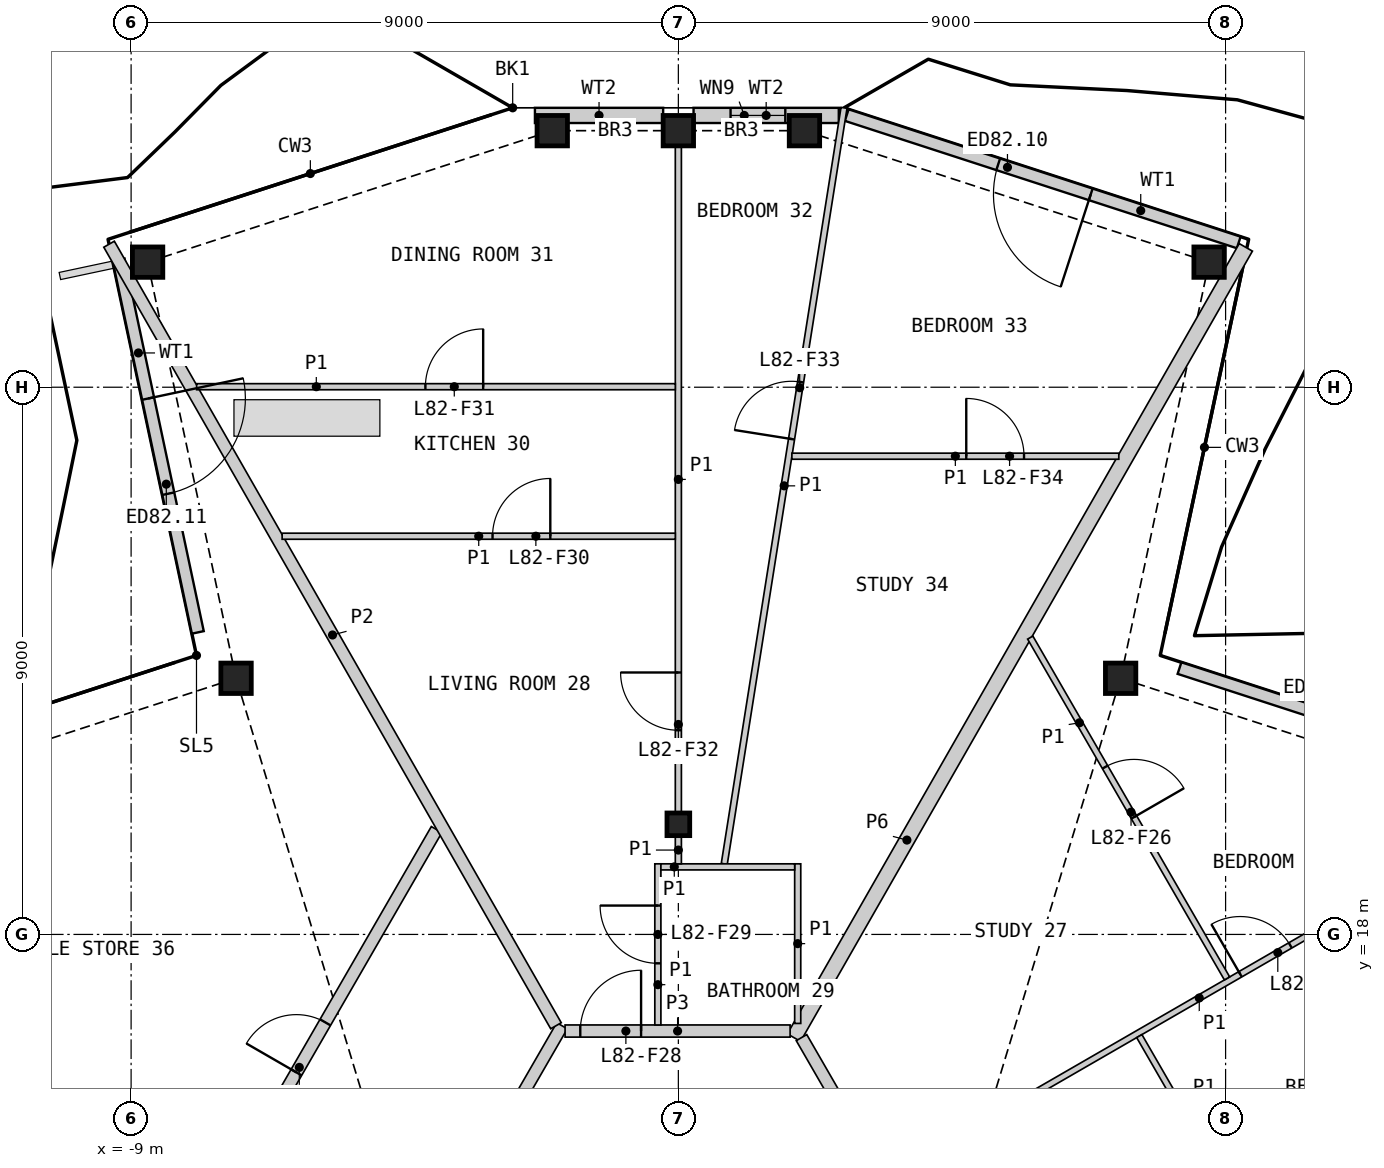
"""IFC4 building model, lengths in metres.
Left out: names, types, materials, properties, quantities, classifications, styles, units other than length and angle.
Written with IfcOpenShell. Run it as: python <this file> out.ifc"""

import sys

from ifc_helpers import new_model, si_unit, direction, frame, frame_2d, origin, origin_2d, place, context, subcontext, project, spatial, rectangle, hollow_rectangle, i_section, extrude, element, fill, save


model = new_model("IFC4")
c1 = context("Model", 3, precision=1e-05, world=origin(), true_north=direction((0.0, 1.0)))
c2 = subcontext(c1, "Body", "Model", "MODEL_VIEW")
j1 = project(units=[si_unit("LENGTHUNIT", "METRE"), si_unit("PLANEANGLEUNIT", "RADIAN")], contexts=[c1])
p1 = place(None, origin())
s1 = spatial("IfcSite", under=j1, at=p1, CompositionType="ELEMENT")
p2 = place(p1, origin())
s2 = spatial("IfcBuilding", under=s1, at=p2, CompositionType="ELEMENT")
p3 = place(p2, frame((0.0, 0.0, 367.8)))
s3 = spatial("IfcBuildingStorey", under=s2, at=p3, CompositionType="ELEMENT", Elevation=367.8)
for number, where, z_axis, x_axis in (
    (1, (7.274, 22.213, 0.0), (0.0, 0.0, 1.0), (1.0, 0.0, 0.0)),
    (2, (8.729, 29.057, 0.0), (0.0, 0.0, 1.0), (1.0, 0.0, 0.0)),
    (3, (2.074, 31.219, 0.0), (0.0, 0.0, 1.0), (1.0, 0.0, 0.0)),
    (4, (0.0, 31.219, 0.0), (0.0, 0.0, 1.0), (1.0, 0.0, 0.0)),
    (5, (-2.074, 31.219, 0.0), (0.0, 0.0, 1.0), (1.0, 0.0, 0.0)),
    (6, (-8.729, 29.057, 0.0), (0.0, 0.0, 1.0), (1.0, 0.0, 0.0)),
    (7, (-7.274, 22.213, 0.0), (0.0, 0.0, 1.0), (1.0, 0.0, 0.0)),
):
    element("IfcColumn", number, at=place(p3, frame(where, z_axis=z_axis, x_axis=x_axis)), inside=s3, PredefinedType="COLUMN", context=c2, shape_type="SweptSolid", body=[
        extrude(hollow_rectangle(XDim=0.5, YDim=0.5, WallThickness=0.03, at=origin_2d()), origin(), (0.0, 0.0, 1.0), 3.4),
    ])
p4 = place(p3, frame((0.0, 19.811, 0.0), z_axis=(0.0, 0.0, 1.0), x_axis=(1.0, 0.0, 0.0)))
e8 = element("IfcColumn", 8, at=p4, inside=s3, PredefinedType="COLUMN", context=c2, shape_type="SweptSolid", body=[
    extrude(i_section(OverallWidth=0.374, OverallDepth=0.372, WebThickness=0.016, FlangeThickness=0.026, at=origin_2d()), origin(), (0.0, 0.0, 1.0), 3.4),
])
p5 = place(p3, frame((14.331, 20.402, 0.0), z_axis=(0.0, 0.0, 1.0), x_axis=(-0.951058447414, 0.30901105094, 0.0)))
e9 = element("IfcWall", 9, at=p5, inside=s3, PredefinedType="SOLIDWALL", context=c2, shape_type="SweptSolid", body=[
    extrude(rectangle(XDim=6.402, YDim=0.2, at=frame_2d((3.201, 0.0))), origin(), (0.0, 0.0, 1.0), 2.634),
])
p6 = place(p5, frame((2.469, 0.0, 0.0)))
e10 = element("IfcOpeningElement", 10, at=p6, cuts=e9, PredefinedType="OPENING", context=c2, shape_type="SweptSolid", body=[
    extrude(rectangle(XDim=1.6, YDim=2.25, at=frame_2d((0.8, 1.125))), frame((0.0, 0.11, 0.0), z_axis=(0.0, -1.0, 0.0), x_axis=(1.0, 0.0, 0.0)), (0.0, 0.0, 1.0), 0.22),
])
p7 = place(p3, frame((9.216, 29.381, 0.0), z_axis=(0.0, 0.0, 1.0), x_axis=(-0.951058150748, 0.309011964002, 0.0)))
e11 = element("IfcWall", 11, at=p7, inside=s3, PredefinedType="SOLIDWALL", context=c2, shape_type="SweptSolid", body=[
    extrude(rectangle(XDim=6.779, YDim=0.2, at=frame_2d((3.389, 0.0))), origin(), (0.0, 0.0, 1.0), 2.634),
])
p8 = place(p7, frame((2.559, 0.0, 0.0)))
e12 = element("IfcOpeningElement", 12, at=p8, cuts=e11, PredefinedType="OPENING", context=c2, shape_type="SweptSolid", body=[
    extrude(rectangle(XDim=1.6, YDim=2.25, at=frame_2d((0.8, 1.125))), frame((0.0, 0.11, 0.0), z_axis=(0.0, -1.0, 0.0), x_axis=(1.0, 0.0, 0.0)), (0.0, 0.0, 1.0), 0.22),
])
p9 = place(p3, frame((2.638, 31.47, 0.0), z_axis=(0.0, 0.0, 1.0), x_axis=(-1.0, 0.0, 0.0)))
e13 = element("IfcWall", 13, at=p9, inside=s3, PredefinedType="SOLIDWALL", context=c2, shape_type="SweptSolid", body=[
    extrude(rectangle(XDim=2.388, YDim=0.25, at=frame_2d((1.194, 0.0))), origin(), (0.0, 0.0, 1.0), 2.634),
])
p10 = place(p9, frame((0.88, 0.0, 0.6)))
e14 = element("IfcOpeningElement", 14, at=p10, cuts=e13, PredefinedType="OPENING", context=c2, shape_type="SweptSolid", body=[
    extrude(rectangle(XDim=0.9, YDim=1.8, at=frame_2d((0.45, 0.9))), frame((0.0, 0.135, 0.0), z_axis=(0.0, -1.0, 0.0), x_axis=(1.0, 0.0, 0.0)), (0.0, 0.0, 1.0), 0.27),
])
p11 = place(p3, frame((-0.25, 31.47, 0.0), z_axis=(0.0, 0.0, 1.0), x_axis=(-1.0, 0.0, 0.0)))
e15 = element("IfcWall", 15, at=p11, inside=s3, PredefinedType="SOLIDWALL", context=c2, shape_type="SweptSolid", body=[
    extrude(rectangle(XDim=2.109, YDim=0.25, at=frame_2d((1.054, 0.0))), origin(), (0.0, 0.0, 1.0), 2.634),
])
p12 = place(p3, frame((-9.206, 29.096, 0.0), z_axis=(0.0, 0.0, 1.0), x_axis=(0.207889514624, -0.978152314167, 0.0)))
e16 = element("IfcWall", 16, at=p12, inside=s3, PredefinedType="SOLIDWALL", context=c2, shape_type="SweptSolid", body=[
    extrude(rectangle(XDim=6.265, YDim=0.2, at=frame_2d((3.133, 0.0))), origin(), (0.0, 0.0, 1.0), 2.634),
])
p13 = place(p12, frame((2.333, 0.0, 0.0)))
e17 = element("IfcOpeningElement", 17, at=p13, cuts=e16, PredefinedType="OPENING", context=c2, shape_type="SweptSolid", body=[
    extrude(rectangle(XDim=1.6, YDim=2.25, at=frame_2d((0.8, 1.125))), frame((0.0, 0.11, 0.0), z_axis=(0.0, -1.0, 0.0), x_axis=(1.0, 0.0, 0.0)), (0.0, 0.0, 1.0), 0.22),
])
p14 = place(p3, frame((1.901, 16.302, 0.0), z_axis=(0.0, 0.0, 1.0), x_axis=(0.496368960053, 0.86811166073, 0.0)))
e18 = element("IfcWall", 18, at=p14, inside=s3, PredefinedType="PARTITIONING", context=c2, shape_type="SweptSolid", body=[
    extrude(rectangle(XDim=14.972, YDim=0.25, at=frame_2d((7.486, 0.0))), origin(), (0.0, 0.0, 1.0), 2.33),
])
p15 = place(p3, frame((2.025, 16.303, 0.0), z_axis=(0.0, 0.0, 1.0), x_axis=(0.500004215162, -0.866022970146, 0.0)))
e19 = element("IfcWall", 19, at=p15, inside=s3, PredefinedType="PARTITIONING", context=c2, shape_type="SweptSolid", body=[
    extrude(rectangle(XDim=4.3, YDim=0.2, at=frame_2d((2.15, 0.0))), origin(), (0.0, 0.0, 1.0), 3.1),
])
p16 = place(p3, frame((-4.176, 12.579, 0.0), z_axis=(0.0, 0.0, 1.0), x_axis=(0.499974648164, 0.866040040179, 0.0)))
e20 = element("IfcWall", 20, at=p16, inside=s3, PredefinedType="PARTITIONING", context=c2, shape_type="SweptSolid", body=[
    extrude(rectangle(XDim=4.525, YDim=0.2, at=frame_2d((2.263, 0.0))), origin(), (0.0, 0.0, 1.0), 3.1),
])
p17 = place(p3, frame((-1.863, 16.411, 0.0), z_axis=(0.0, 0.0, 1.0), x_axis=(1.0, 0.0, 0.0)))
e21 = element("IfcWall", 21, at=p17, inside=s3, PredefinedType="PARTITIONING", context=c2, shape_type="SweptSolid", body=[
    extrude(rectangle(XDim=3.701, YDim=0.2, at=frame_2d((1.851, 0.0))), origin(), (0.0, 0.0, 1.0), 3.1),
])
p18 = place(p17, frame((0.25, 0.0, 0.0)))
e22 = element("IfcOpeningElement", 22, at=p18, cuts=e21, PredefinedType="OPENING", context=c2, shape_type="SweptSolid", body=[
    extrude(rectangle(XDim=1.0, YDim=2.1, at=frame_2d((0.5, 1.05))), frame((0.0, 0.11, 0.0), z_axis=(0.0, -1.0, 0.0), x_axis=(1.0, 0.0, 0.0)), (0.0, 0.0, 1.0), 0.22),
])
p19 = place(p3, frame((-11.473, 6.74, 0.0), z_axis=(0.0, 0.0, 1.0), x_axis=(0.499993542657, 0.866029131901, 0.0)))
e23 = element("IfcWall", 23, at=p19, inside=s3, PredefinedType="PARTITIONING", context=c2, shape_type="SweptSolid", body=[
    extrude(rectangle(XDim=14.994, YDim=0.2, at=frame_2d((7.497, 0.0))), origin(), (0.0, 0.0, 1.0), 2.33),
])
p20 = place(p19, frame((10.383, 0.0, 0.0)))
e24 = element("IfcOpeningElement", 24, at=p20, cuts=e23, PredefinedType="OPENING", context=c2, shape_type="SweptSolid", body=[
    extrude(rectangle(XDim=0.95, YDim=2.1, at=frame_2d((0.475, 1.05))), frame((0.0, 0.11, 0.0), z_axis=(0.0, -1.0, 0.0), x_axis=(1.0, 0.0, 0.0)), (0.0, 0.0, 1.0), 0.22),
])
p21 = place(p3, frame((-9.362, 29.352, 0.0), z_axis=(0.0, 0.0, 1.0), x_axis=(0.496351997927, -0.868121359116, 0.0)))
e25 = element("IfcWall", 25, at=p21, inside=s3, PredefinedType="PARTITIONING", context=c2, shape_type="SweptSolid", body=[
    extrude(rectangle(XDim=14.807, YDim=0.2, at=frame_2d((7.404, 0.0))), origin(), (0.0, 0.0, 1.0), 2.33),
])
p22 = place(p3, frame((0.755, 19.16, 0.0), z_axis=(0.0, 0.0, 1.0), x_axis=(0.15643456532, 0.987688324712, 0.0)))
e26 = element("IfcWall", 26, at=p22, inside=s3, PredefinedType="PARTITIONING", context=c2, shape_type="SweptSolid", body=[
    extrude(rectangle(XDim=12.59, YDim=0.1, at=frame_2d((6.295, 0.0))), origin(), (0.0, 0.0, 1.0), 2.33),
])
p23 = place(p22, frame((7.074, 0.0, 0.0)))
e27 = element("IfcOpeningElement", 27, at=p23, cuts=e26, PredefinedType="OPENING", context=c2, shape_type="SweptSolid", body=[
    extrude(rectangle(XDim=0.95, YDim=2.1, at=frame_2d((0.475, 1.05))), frame((0.0, 0.06, 0.0), z_axis=(0.0, -1.0, 0.0), x_axis=(1.0, 0.0, 0.0)), (0.0, 0.0, 1.0), 0.12),
])
p24 = place(p3, frame((3.465, 14.01, 0.0), z_axis=(0.0, 0.0, 1.0), x_axis=(0.866032376801, 0.499987922186, 0.0)))
e28 = element("IfcWall", 28, at=p24, inside=s3, PredefinedType="PARTITIONING", context=c2, shape_type="SweptSolid", body=[
    extrude(rectangle(XDim=11.782, YDim=0.1, at=frame_2d((5.891, 0.0))), origin(), (0.0, 0.0, 1.0), 2.33),
])
p25 = place(p24, frame((6.67, 0.0, 0.0)))
e29 = element("IfcOpeningElement", 29, at=p25, cuts=e28, PredefinedType="OPENING", context=c2, shape_type="SweptSolid", body=[
    extrude(rectangle(XDim=0.95, YDim=2.1, at=frame_2d((0.475, 1.05))), frame((0.0, 0.06, 0.0), z_axis=(0.0, -1.0, 0.0), x_axis=(1.0, 0.0, 0.0)), (0.0, 0.0, 1.0), 0.12),
])
p26 = place(p3, frame((0.0, 20.008, 0.0), z_axis=(0.0, 0.0, 1.0), x_axis=(0.0, 1.0, 0.0)))
e30 = element("IfcWall", 30, at=p26, inside=s3, PredefinedType="PARTITIONING", context=c2, shape_type="SweptSolid", body=[
    extrude(rectangle(XDim=10.951, YDim=0.1, at=frame_2d((5.476, 0.0))), origin(), (0.0, 0.0, 1.0), 2.33),
])
p27 = place(p26, frame((1.35, 0.0, 0.0)))
e31 = element("IfcOpeningElement", 31, at=p27, cuts=e30, PredefinedType="OPENING", context=c2, shape_type="SweptSolid", body=[
    extrude(rectangle(XDim=0.95, YDim=2.1, at=frame_2d((0.475, 1.05))), frame((0.0, 0.06, 0.0), z_axis=(0.0, -1.0, 0.0), x_axis=(1.0, 0.0, 0.0)), (0.0, 0.0, 1.0), 0.12),
])
p28 = place(p3, frame((-7.922, 27.009, 0.0), z_axis=(0.0, 0.0, 1.0), x_axis=(1.0, 0.0, 0.0)))
e32 = element("IfcWall", 32, at=p28, inside=s3, PredefinedType="PARTITIONING", context=c2, shape_type="SweptSolid", body=[
    extrude(rectangle(XDim=7.872, YDim=0.1, at=frame_2d((3.936, 0.0))), origin(), (0.0, 0.0, 1.0), 2.33),
])
p29 = place(p28, frame((3.762, 0.0, 0.0)))
e33 = element("IfcOpeningElement", 33, at=p29, cuts=e32, PredefinedType="OPENING", context=c2, shape_type="SweptSolid", body=[
    extrude(rectangle(XDim=0.95, YDim=2.1, at=frame_2d((0.475, 1.05))), frame((0.0, 0.06, 0.0), z_axis=(0.0, -1.0, 0.0), x_axis=(1.0, 0.0, 0.0)), (0.0, 0.0, 1.0), 0.12),
])
p30 = place(p3, frame((5.787, 22.882, 0.0), z_axis=(0.0, 0.0, 1.0), x_axis=(0.500001069878, -0.866024786089, 0.0)))
e34 = element("IfcWall", 34, at=p30, inside=s3, PredefinedType="PARTITIONING", context=c2, shape_type="SweptSolid", body=[
    extrude(rectangle(XDim=6.473, YDim=0.1, at=frame_2d((3.236, 0.0))), origin(), (0.0, 0.0, 1.0), 2.33),
])
p31 = place(p30, frame((2.46, 0.0, 0.0)))
e35 = element("IfcOpeningElement", 35, at=p31, cuts=e34, PredefinedType="OPENING", context=c2, shape_type="SweptSolid", body=[
    extrude(rectangle(XDim=0.95, YDim=2.1, at=frame_2d((0.475, 1.05))), frame((0.0, 0.06, 0.0), z_axis=(0.0, -1.0, 0.0), x_axis=(1.0, 0.0, 0.0)), (0.0, 0.0, 1.0), 0.12),
])
p32 = place(p3, frame((-6.516, 24.549, 0.0), z_axis=(0.0, 0.0, 1.0), x_axis=(1.0, 0.0, 0.0)))
e36 = element("IfcWall", 36, at=p32, inside=s3, PredefinedType="PARTITIONING", context=c2, shape_type="SweptSolid", body=[
    extrude(rectangle(XDim=6.466, YDim=0.1, at=frame_2d((3.233, 0.0))), origin(), (0.0, 0.0, 1.0), 2.33),
])
p33 = place(p32, frame((3.46, 0.0, 0.0)))
e37 = element("IfcOpeningElement", 37, at=p33, cuts=e36, PredefinedType="OPENING", context=c2, shape_type="SweptSolid", body=[
    extrude(rectangle(XDim=0.95, YDim=2.1, at=frame_2d((0.475, 1.05))), frame((0.0, 0.06, 0.0), z_axis=(0.0, -1.0, 0.0), x_axis=(1.0, 0.0, 0.0)), (0.0, 0.0, 1.0), 0.12),
])
p34 = place(p3, frame((1.867, 25.865, 0.0), z_axis=(0.0, 0.0, 1.0), x_axis=(1.0, 0.0, 0.0)))
e38 = element("IfcWall", 38, at=p34, inside=s3, PredefinedType="PARTITIONING", context=c2, shape_type="SweptSolid", body=[
    extrude(rectangle(XDim=5.376, YDim=0.1, at=frame_2d((2.688, 0.0))), origin(), (0.0, 0.0, 1.0), 2.33),
])
p35 = place(p34, frame((2.868, 0.0, 0.0)))
e39 = element("IfcOpeningElement", 39, at=p35, cuts=e38, PredefinedType="OPENING", context=c2, shape_type="SweptSolid", body=[
    extrude(rectangle(XDim=0.95, YDim=2.1, at=frame_2d((0.475, 1.05))), frame((0.0, 0.06, 0.0), z_axis=(0.0, -1.0, 0.0), x_axis=(1.0, 0.0, 0.0)), (0.0, 0.0, 1.0), 0.12),
])
p36 = place(p3, frame((7.581, 16.328, 0.0), z_axis=(0.0, 0.0, 1.0), x_axis=(0.500005610874, -0.86602216432, 0.0)))
e40 = element("IfcWall", 40, at=p36, inside=s3, PredefinedType="PARTITIONING", context=c2, shape_type="SweptSolid", body=[
    extrude(rectangle(XDim=5.1, YDim=0.1, at=frame_2d((2.55, 0.0))), origin(), (0.0, 0.0, 1.0), 2.33),
])
p37 = place(p36, frame((2.379, 0.0, 0.0)))
e41 = element("IfcOpeningElement", 41, at=p37, cuts=e40, PredefinedType="OPENING", context=c2, shape_type="SweptSolid", body=[
    extrude(rectangle(XDim=0.95, YDim=2.1, at=frame_2d((0.475, 1.05))), frame((0.0, 0.06, 0.0), z_axis=(0.0, -1.0, 0.0), x_axis=(1.0, 0.0, 0.0)), (0.0, 0.0, 1.0), 0.12),
])
p38 = place(p3, frame((-0.337, 16.511, 0.0), z_axis=(0.0, 0.0, 1.0), x_axis=(0.0, 1.0, 0.0)))
e42 = element("IfcWall", 42, at=p38, inside=s3, PredefinedType="PARTITIONING", context=c2, shape_type="SweptSolid", body=[
    extrude(rectangle(XDim=2.65, YDim=0.1, at=frame_2d((1.325, 0.0))), origin(), (0.0, 0.0, 1.0), 2.33),
])
p39 = place(p38, frame((1.014, 0.0, 0.0)))
e43 = element("IfcOpeningElement", 43, at=p39, cuts=e42, PredefinedType="OPENING", context=c2, shape_type="SweptSolid", body=[
    extrude(rectangle(XDim=0.95, YDim=2.1, at=frame_2d((0.475, 1.05))), frame((0.0, 0.06, 0.0), z_axis=(0.0, -1.0, 0.0), x_axis=(1.0, 0.0, 0.0)), (0.0, 0.0, 1.0), 0.12),
])
p40 = place(p3, frame((1.963, 16.536, 0.0), z_axis=(0.0, 0.0, 1.0), x_axis=(0.0, 1.0, 0.0)))
e44 = element("IfcWall", 44, at=p40, inside=s3, PredefinedType="PARTITIONING", context=c2, shape_type="SweptSolid", body=[
    extrude(rectangle(XDim=2.625, YDim=0.1, at=frame_2d((1.312, 0.0))), origin(), (0.0, 0.0, 1.0), 2.33),
])
p41 = place(p3, frame((-0.287, 19.111, 0.0), z_axis=(0.0, 0.0, 1.0), x_axis=(1.0, 0.0, 0.0)))
e45 = element("IfcWall", 45, at=p41, inside=s3, PredefinedType="PARTITIONING", context=c2, shape_type="SweptSolid", body=[
    extrude(rectangle(XDim=2.2, YDim=0.1, at=frame_2d((1.1, 0.0))), origin(), (0.0, 0.0, 1.0), 2.33),
])
p42 = place(p3, frame((0.0, 19.161, 0.0), z_axis=(0.0, 0.0, 1.0), x_axis=(0.0, 1.0, 0.0)))
e46 = element("IfcWall", 46, at=p42, inside=s3, PredefinedType="PARTITIONING", context=c2, shape_type="SweptSolid", body=[
    extrude(rectangle(XDim=0.453, YDim=0.1, at=frame_2d((0.227, 0.0))), origin(), (0.0, 0.0, 1.0), 2.33),
])
p43 = place(p8, origin())
e47 = element("IfcDoor", 47, at=p43, inside=s3, OperationType="DOUBLE_DOOR_SINGLE_SWING", PredefinedType="DOOR", context=c2, shape_type="SweptSolid", body=[
    extrude(rectangle(XDim=1.6, YDim=2.25, at=frame_2d((0.8, 1.125))), frame((0.0, 0.025, 0.0), z_axis=(0.0, -1.0, 0.0), x_axis=(1.0, 0.0, 0.0)), (0.0, 0.0, 1.0), 0.05),
])
fill(e12, e47)
p44 = place(p10, origin())
e48 = element("IfcWindow", 48, at=p44, inside=s3, PartitioningType="SINGLE_PANEL", PredefinedType="WINDOW", context=c2, shape_type="SweptSolid", body=[
    extrude(rectangle(XDim=0.9, YDim=1.8, at=frame_2d((0.45, 0.9))), frame((0.0, 0.03, 0.0), z_axis=(0.0, -1.0, 0.0), x_axis=(1.0, 0.0, 0.0)), (0.0, 0.0, 1.0), 0.06),
])
fill(e14, e48)
p45 = place(p13, origin())
e49 = element("IfcDoor", 49, at=p45, inside=s3, OperationType="DOUBLE_DOOR_SINGLE_SWING", PredefinedType="DOOR", context=c2, shape_type="SweptSolid", body=[
    extrude(rectangle(XDim=1.6, YDim=2.25, at=frame_2d((0.8, 1.125))), frame((0.0, 0.025, 0.0), z_axis=(0.0, -1.0, 0.0), x_axis=(1.0, 0.0, 0.0)), (0.0, 0.0, 1.0), 0.05),
])
fill(e17, e49)
p46 = place(p25, origin())
e50 = element("IfcDoor", 50, at=p46, inside=s3, OperationType="SINGLE_SWING_LEFT", PredefinedType="DOOR", context=c2, shape_type="SweptSolid", body=[
    extrude(rectangle(XDim=0.95, YDim=2.1, at=frame_2d((0.475, 1.05))), frame((0.0, 0.025, 0.0), z_axis=(0.0, -1.0, 0.0), x_axis=(1.0, 0.0, 0.0)), (0.0, 0.0, 1.0), 0.05),
])
fill(e29, e50)
p47 = place(p31, origin())
e51 = element("IfcDoor", 51, at=p47, inside=s3, OperationType="SINGLE_SWING_RIGHT", PredefinedType="DOOR", context=c2, shape_type="SweptSolid", body=[
    extrude(rectangle(XDim=0.95, YDim=2.1, at=frame_2d((0.475, 1.05))), frame((0.0, 0.025, 0.0), z_axis=(0.0, -1.0, 0.0), x_axis=(1.0, 0.0, 0.0)), (0.0, 0.0, 1.0), 0.05),
])
fill(e35, e51)
p48 = place(p18, origin())
e52 = element("IfcDoor", 52, at=p48, inside=s3, OperationType="SINGLE_SWING_RIGHT", PredefinedType="DOOR", context=c2, shape_type="SweptSolid", body=[
    extrude(rectangle(XDim=1.0, YDim=2.1, at=frame_2d((0.5, 1.05))), frame((0.0, 0.025, 0.0), z_axis=(0.0, -1.0, 0.0), x_axis=(1.0, 0.0, 0.0)), (0.0, 0.0, 1.0), 0.05),
])
fill(e22, e52)
p49 = place(p39, origin())
e53 = element("IfcDoor", 53, at=p49, inside=s3, OperationType="SINGLE_SWING_RIGHT", PredefinedType="DOOR", context=c2, shape_type="SweptSolid", body=[
    extrude(rectangle(XDim=0.95, YDim=2.1, at=frame_2d((0.475, 1.05))), frame((0.0, 0.025, 0.0), z_axis=(0.0, -1.0, 0.0), x_axis=(1.0, 0.0, 0.0)), (0.0, 0.0, 1.0), 0.05),
])
fill(e43, e53)
p50 = place(p33, origin())
e54 = element("IfcDoor", 54, at=p50, inside=s3, OperationType="SINGLE_SWING_RIGHT", PredefinedType="DOOR", context=c2, shape_type="SweptSolid", body=[
    extrude(rectangle(XDim=0.95, YDim=2.1, at=frame_2d((0.475, 1.05))), frame((0.0, 0.025, 0.0), z_axis=(0.0, -1.0, 0.0), x_axis=(1.0, 0.0, 0.0)), (0.0, 0.0, 1.0), 0.05),
])
fill(e37, e54)
p51 = place(p29, origin())
e55 = element("IfcDoor", 55, at=p51, inside=s3, OperationType="SINGLE_SWING_RIGHT", PredefinedType="DOOR", context=c2, shape_type="SweptSolid", body=[
    extrude(rectangle(XDim=0.95, YDim=2.1, at=frame_2d((0.475, 1.05))), frame((0.0, 0.025, 0.0), z_axis=(0.0, -1.0, 0.0), x_axis=(1.0, 0.0, 0.0)), (0.0, 0.0, 1.0), 0.05),
])
fill(e33, e55)
p52 = place(p27, origin())
e56 = element("IfcDoor", 56, at=p52, inside=s3, OperationType="SINGLE_SWING_RIGHT", PredefinedType="DOOR", context=c2, shape_type="SweptSolid", body=[
    extrude(rectangle(XDim=0.95, YDim=2.1, at=frame_2d((0.475, 1.05))), frame((0.0, 0.025, 0.0), z_axis=(0.0, -1.0, 0.0), x_axis=(1.0, 0.0, 0.0)), (0.0, 0.0, 1.0), 0.05),
])
fill(e31, e56)
p53 = place(p23, origin())
e57 = element("IfcDoor", 57, at=p53, inside=s3, OperationType="SINGLE_SWING_LEFT", PredefinedType="DOOR", context=c2, shape_type="SweptSolid", body=[
    extrude(rectangle(XDim=0.95, YDim=2.1, at=frame_2d((0.475, 1.05))), frame((0.0, 0.025, 0.0), z_axis=(0.0, -1.0, 0.0), x_axis=(1.0, 0.0, 0.0)), (0.0, 0.0, 1.0), 0.05),
])
fill(e27, e57)
p54 = place(p35, origin())
e58 = element("IfcDoor", 58, at=p54, inside=s3, OperationType="SINGLE_SWING_LEFT", PredefinedType="DOOR", context=c2, shape_type="SweptSolid", body=[
    extrude(rectangle(XDim=0.95, YDim=2.1, at=frame_2d((0.475, 1.05))), frame((0.0, 0.025, 0.0), z_axis=(0.0, -1.0, 0.0), x_axis=(1.0, 0.0, 0.0)), (0.0, 0.0, 1.0), 0.05),
])
fill(e39, e58)
p55 = place(p20, origin())
e59 = element("IfcDoor", 59, at=p55, inside=s3, OperationType="SINGLE_SWING_LEFT", PredefinedType="DOOR", context=c2, shape_type="SweptSolid", body=[
    extrude(rectangle(XDim=0.95, YDim=2.1, at=frame_2d((0.475, 1.05))), frame((0.0, 0.025, 0.0), z_axis=(0.0, -1.0, 0.0), x_axis=(1.0, 0.0, 0.0)), (0.0, 0.0, 1.0), 0.05),
])
fill(e24, e59)
save(model, sys.argv[1])
